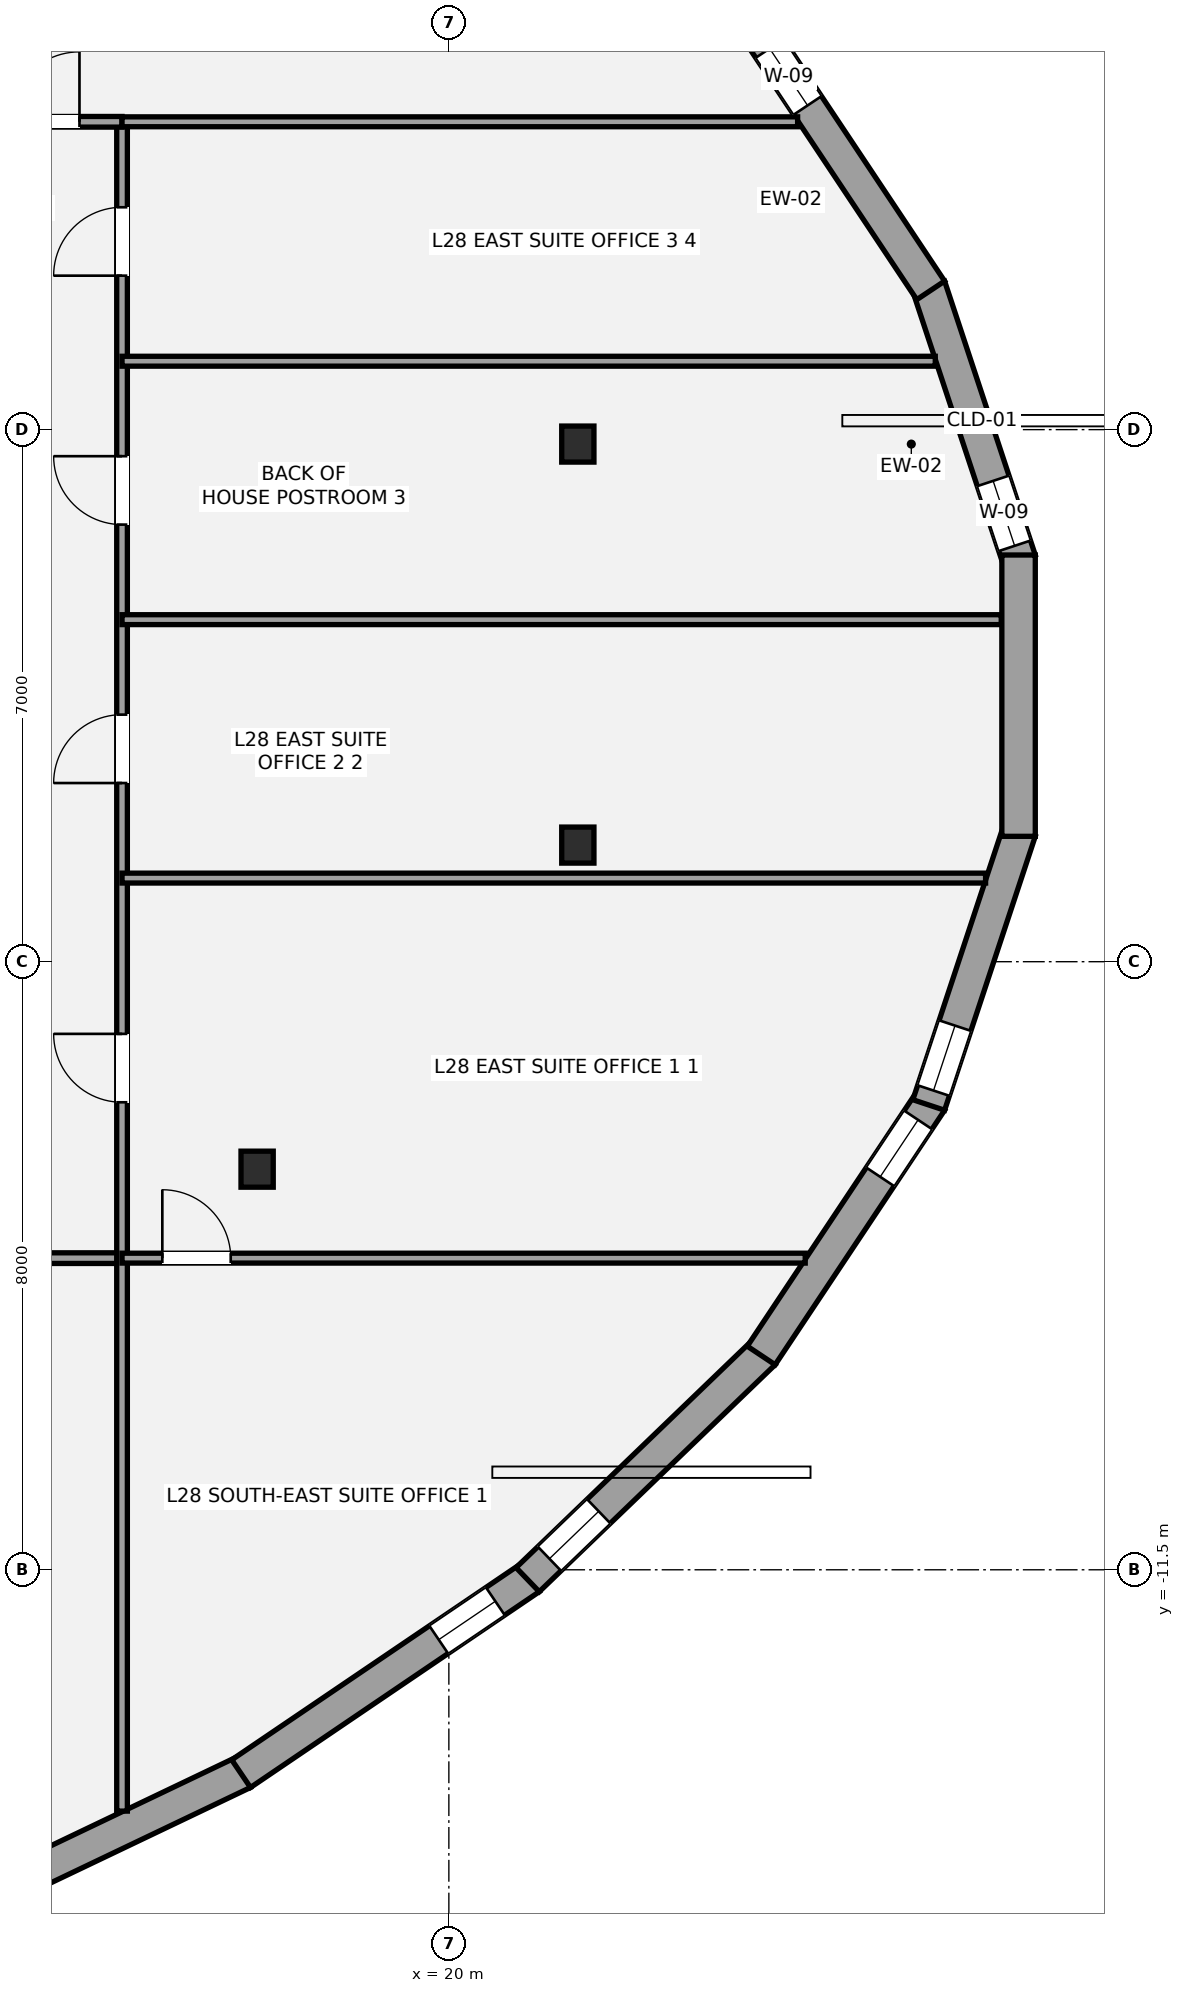
"""IFC4 building model, lengths in metres.
Left out: names, types, materials, properties, quantities, classifications, styles, units other than length and angle.
Written with IfcOpenShell. Run it as: python <this file> out.ifc"""

import sys

from ifc_helpers import new_model, si_unit, direction, frame, frame_2d, origin, origin_2d, place, context, subcontext, project, spatial, rectangle, i_section, extrude, element, fill, save


model = new_model("IFC4")
c1 = context("Model", 3, precision=1e-05, world=origin(), true_north=direction((0.0, 1.0)))
c2 = subcontext(c1, "Body", "Model", "MODEL_VIEW")
j1 = project(units=[si_unit("LENGTHUNIT", "METRE"), si_unit("PLANEANGLEUNIT", "RADIAN")], contexts=[c1])
p1 = place(None, origin())
s1 = spatial("IfcSite", under=j1, at=p1, CompositionType="ELEMENT")
p2 = place(p1, origin())
s2 = spatial("IfcBuilding", under=s1, at=p2, CompositionType="ELEMENT")
p3 = place(p2, frame((0.0, 0.0, 107.1)))
s3 = spatial("IfcBuildingStorey", under=s2, at=p3, CompositionType="ELEMENT", Elevation=107.1)
for number, where, z_axis, x_axis in (
    (1, (21.697, 3.31, 0.0), (0.0, 0.0, 1.0), (1.0, 0.0, 0.0)),
    (2, (17.477, -6.229, 0.0), (0.0, 0.0, 1.0), (1.0, 0.0, 0.0)),
    (3, (21.697, -1.966, 0.0), (0.0, 0.0, 1.0), (1.0, 0.0, 0.0)),
):
    element("IfcColumn", number, at=place(p3, frame(where, z_axis=z_axis, x_axis=x_axis)), inside=s3, PredefinedType="COLUMN", context=c2, shape_type="SweptSolid", body=[
        extrude(i_section(OverallWidth=0.424, OverallDepth=0.474, WebThickness=0.048, FlangeThickness=0.077, at=origin_2d()), origin(), (0.0, 0.0, 1.0), 3.5),
    ])
p4 = place(p3, frame((26.314, 5.385, 0.0), z_axis=(0.0, 0.0, 1.0), x_axis=(0.314316911692, -0.94931811266, 0.0)))
e4 = element("IfcWall", 4, at=p4, inside=s3, PredefinedType="STANDARD", context=c2, shape_type="SweptSolid", body=[
    extrude(rectangle(XDim=3.796, YDim=0.44, at=frame_2d((1.898, 0.0))), origin(), (0.0, 0.0, 1.0), 2.528),
])
p5 = place(p4, frame((2.696, 0.0, 0.58)))
e5 = element("IfcOpeningElement", 5, at=p5, cuts=e4, PredefinedType="OPENING", context=c2, shape_type="SweptSolid", body=[
    extrude(rectangle(XDim=0.9, YDim=1.35, at=frame_2d((0.45, 0.675))), frame((0.0, 0.23, 0.0), z_axis=(0.0, -1.0, 0.0), x_axis=(1.0, 0.0, 0.0)), (0.0, 0.0, 1.0), 0.46),
])
p6 = place(p3, frame((24.11, 8.68, 0.0), z_axis=(0.0, 0.0, 1.0), x_axis=(0.554293965046, -0.83232097193, 0.0)))
e6 = element("IfcWall", 6, at=p6, inside=s3, PredefinedType="STANDARD", context=c2, shape_type="SweptSolid", body=[
    extrude(rectangle(XDim=4.023, YDim=0.44, at=frame_2d((2.011, 0.0))), origin(), (0.0, 0.0, 1.0), 2.528),
])
p7 = place(p6, frame((0.2, 0.0, 0.58)))
e7 = element("IfcOpeningElement", 7, at=p7, cuts=e6, PredefinedType="OPENING", context=c2, shape_type="SweptSolid", body=[
    extrude(rectangle(XDim=0.9, YDim=1.35, at=frame_2d((0.45, 0.675))), frame((0.0, 0.23, 0.0), z_axis=(0.0, -1.0, 0.0), x_axis=(1.0, 0.0, 0.0)), (0.0, 0.0, 1.0), 0.46),
])
p8 = place(p3, frame((17.295, -14.166, 0.0), z_axis=(0.0, 0.0, 1.0), x_axis=(-0.902372757907, -0.430956385018, 0.0)))
e8 = element("IfcWall", 8, at=p8, inside=s3, PredefinedType="STANDARD", context=c2, shape_type="SweptSolid", body=[
    extrude(rectangle(XDim=4.882, YDim=0.44, at=frame_2d((2.441, 0.0))), origin(), (0.0, 0.0, 1.0), 2.528),
])
p9 = place(p8, frame((3.334, 0.0, 0.58)))
e9 = element("IfcOpeningElement", 9, at=p9, cuts=e8, PredefinedType="OPENING", context=c2, shape_type="SweptSolid", body=[
    extrude(rectangle(XDim=0.9, YDim=1.35, at=frame_2d((0.45, 0.675))), frame((0.0, 0.23, 0.0), z_axis=(0.0, -1.0, 0.0), x_axis=(1.0, 0.0, 0.0)), (0.0, 0.0, 1.0), 0.46),
])
p10 = place(p3, frame((21.066, -11.606, 0.0), z_axis=(0.0, 0.0, 1.0), x_axis=(-0.827754551165, -0.56109036975, 0.0)))
e10 = element("IfcWall", 10, at=p10, inside=s3, PredefinedType="STANDARD", context=c2, shape_type="SweptSolid", body=[
    extrude(rectangle(XDim=4.591, YDim=0.44, at=frame_2d((2.295, 0.0))), origin(), (0.0, 0.0, 1.0), 2.528),
])
p11 = place(p10, frame((0.549, 0.0, 0.58)))
e11 = element("IfcOpeningElement", 11, at=p11, cuts=e10, PredefinedType="OPENING", context=c2, shape_type="SweptSolid", body=[
    extrude(rectangle(XDim=0.9, YDim=1.35, at=frame_2d((0.45, 0.675))), frame((0.0, 0.23, 0.0), z_axis=(0.0, -1.0, 0.0), x_axis=(1.0, 0.0, 0.0)), (0.0, 0.0, 1.0), 0.46),
])
p12 = place(p3, frame((24.14, -8.644, 0.0), z_axis=(0.0, 0.0, 1.0), x_axis=(-0.720581378362, -0.693370375166, 0.0)))
e12 = element("IfcWall", 12, at=p12, inside=s3, PredefinedType="STANDARD", context=c2, shape_type="SweptSolid", body=[
    extrude(rectangle(XDim=4.307, YDim=0.44, at=frame_2d((2.153, 0.0))), origin(), (0.0, 0.0, 1.0), 2.528),
])
p13 = place(p12, frame((3.01, 0.0, 0.58)))
e13 = element("IfcOpeningElement", 13, at=p13, cuts=e12, PredefinedType="OPENING", context=c2, shape_type="SweptSolid", body=[
    extrude(rectangle(XDim=0.9, YDim=1.35, at=frame_2d((0.45, 0.675))), frame((0.0, 0.23, 0.0), z_axis=(0.0, -1.0, 0.0), x_axis=(1.0, 0.0, 0.0)), (0.0, 0.0, 1.0), 0.46),
])
p14 = place(p3, frame((26.34, -5.332, 0.0), z_axis=(0.0, 0.0, 1.0), x_axis=(-0.554293965046, -0.83232097193, 0.0)))
e14 = element("IfcWall", 14, at=p14, inside=s3, PredefinedType="STANDARD", context=c2, shape_type="SweptSolid", body=[
    extrude(rectangle(XDim=4.023, YDim=0.44, at=frame_2d((2.011, 0.0))), origin(), (0.0, 0.0, 1.0), 2.528),
])
p15 = place(p14, frame((0.299, 0.0, 0.58)))
e15 = element("IfcOpeningElement", 15, at=p15, cuts=e14, PredefinedType="OPENING", context=c2, shape_type="SweptSolid", body=[
    extrude(rectangle(XDim=0.9, YDim=1.35, at=frame_2d((0.45, 0.675))), frame((0.0, 0.23, 0.0), z_axis=(0.0, -1.0, 0.0), x_axis=(1.0, 0.0, 0.0)), (0.0, 0.0, 1.0), 0.46),
])
p16 = place(p3, frame((27.507, -1.781, 0.0), z_axis=(0.0, 0.0, 1.0), x_axis=(-0.314316911692, -0.94931811266, 0.0)))
e16 = element("IfcWall", 16, at=p16, inside=s3, PredefinedType="STANDARD", context=c2, shape_type="SweptSolid", body=[
    extrude(rectangle(XDim=3.796, YDim=0.44, at=frame_2d((1.898, 0.0))), origin(), (0.0, 0.0, 1.0), 2.528),
])
p17 = place(p16, frame((2.696, 0.0, 0.58)))
e17 = element("IfcOpeningElement", 17, at=p17, cuts=e16, PredefinedType="OPENING", context=c2, shape_type="SweptSolid", body=[
    extrude(rectangle(XDim=0.9, YDim=1.35, at=frame_2d((0.45, 0.675))), frame((0.0, 0.23, 0.0), z_axis=(0.0, -1.0, 0.0), x_axis=(1.0, 0.0, 0.0)), (0.0, 0.0, 1.0), 0.46),
])
p18 = place(p3, frame((27.496, 1.851, 0.0), z_axis=(0.0, 0.0, 1.0), x_axis=(0.0, -1.0, 0.0)))
e18 = element("IfcWall", 18, at=p18, inside=s3, PredefinedType="STANDARD", context=c2, shape_type="SweptSolid", body=[
    extrude(rectangle(XDim=3.701, YDim=0.44, at=frame_2d((1.851, 0.0))), origin(), (0.0, 0.0, 1.0), 2.528),
])
p19 = place(p3, frame((-17.5, -7.4, 0.0), z_axis=(0.0, 0.0, 1.0), x_axis=(1.0, 0.0, 0.0)))
e19 = element("IfcWall", 19, at=p19, inside=s3, PredefinedType="PARTITIONING", context=c2, shape_type="SweptSolid", body=[
    extrude(rectangle(XDim=33.2, YDim=0.14, at=frame_2d((16.6, 0.0))), origin(), (0.0, 0.0, 1.0), 2.688),
])
p20 = place(p19, frame((6.3, 0.0, 0.0)))
e20 = element("IfcOpeningElement", 20, at=p20, cuts=e19, PredefinedType="OPENING", context=c2, shape_type="SweptSolid", body=[
    extrude(rectangle(XDim=0.9, YDim=2.1, at=frame_2d((0.45, 1.05))), frame((0.0, 0.08, 0.0), z_axis=(0.0, -1.0, 0.0), x_axis=(1.0, 0.0, 0.0)), (0.0, 0.0, 1.0), 0.16),
])
p21 = place(p19, frame((18.05, 0.0, 0.0)))
e21 = element("IfcOpeningElement", 21, at=p21, cuts=e19, PredefinedType="OPENING", context=c2, shape_type="SweptSolid", body=[
    extrude(rectangle(XDim=0.9, YDim=2.1, at=frame_2d((0.45, 1.05))), frame((0.0, 0.08, 0.0), z_axis=(0.0, -1.0, 0.0), x_axis=(1.0, 0.0, 0.0)), (0.0, 0.0, 1.0), 0.16),
])
p22 = place(p19, frame((27.9, 0.0, 0.0)))
e22 = element("IfcOpeningElement", 22, at=p22, cuts=e19, PredefinedType="OPENING", context=c2, shape_type="SweptSolid", body=[
    extrude(rectangle(XDim=0.9, YDim=2.1, at=frame_2d((0.45, 1.05))), frame((0.0, 0.08, 0.0), z_axis=(0.0, -1.0, 0.0), x_axis=(1.0, 0.0, 0.0)), (0.0, 0.0, 1.0), 0.16),
])
p23 = place(p3, frame((15.7, -14.675, 0.0), z_axis=(0.0, 0.0, 1.0), x_axis=(0.0, 1.0, 0.0)))
e23 = element("IfcWall", 23, at=p23, inside=s3, PredefinedType="PARTITIONING", context=c2, shape_type="SweptSolid", body=[
    extrude(rectangle(XDim=22.225, YDim=0.14, at=frame_2d((11.112, 0.0))), origin(), (0.0, 0.0, 1.0), 2.763),
])
p24 = place(p23, frame((9.325, 0.0, 0.0)))
e24 = element("IfcOpeningElement", 24, at=p24, cuts=e23, PredefinedType="OPENING", context=c2, shape_type="SweptSolid", body=[
    extrude(rectangle(XDim=0.9, YDim=2.1, at=frame_2d((0.45, 1.05))), frame((0.0, 0.08, 0.0), z_axis=(0.0, -1.0, 0.0), x_axis=(1.0, 0.0, 0.0)), (0.0, 0.0, 1.0), 0.16),
])
p25 = place(p23, frame((13.525, 0.0, 0.0)))
e25 = element("IfcOpeningElement", 25, at=p25, cuts=e23, PredefinedType="OPENING", context=c2, shape_type="SweptSolid", body=[
    extrude(rectangle(XDim=0.9, YDim=2.1, at=frame_2d((0.45, 1.05))), frame((0.0, 0.08, 0.0), z_axis=(0.0, -1.0, 0.0), x_axis=(1.0, 0.0, 0.0)), (0.0, 0.0, 1.0), 0.16),
])
p26 = place(p23, frame((16.925, 0.0, 0.0)))
e26 = element("IfcOpeningElement", 26, at=p26, cuts=e23, PredefinedType="OPENING", context=c2, shape_type="SweptSolid", body=[
    extrude(rectangle(XDim=0.9, YDim=2.1, at=frame_2d((0.45, 1.05))), frame((0.0, 0.08, 0.0), z_axis=(0.0, -1.0, 0.0), x_axis=(1.0, 0.0, 0.0)), (0.0, 0.0, 1.0), 0.16),
])
p27 = place(p23, frame((20.2, 0.0, 0.0)))
e27 = element("IfcOpeningElement", 27, at=p27, cuts=e23, PredefinedType="OPENING", context=c2, shape_type="SweptSolid", body=[
    extrude(rectangle(XDim=0.9, YDim=2.1, at=frame_2d((0.45, 1.05))), frame((0.0, 0.08, 0.0), z_axis=(0.0, -1.0, 0.0), x_axis=(1.0, 0.0, 0.0)), (0.0, 0.0, 1.0), 0.16),
])
p28 = place(p3, frame((13.9, 7.55, 0.0), z_axis=(0.0, 0.0, 1.0), x_axis=(1.0, 0.0, 0.0)))
e28 = element("IfcWall", 28, at=p28, inside=s3, PredefinedType="PARTITIONING", context=c2, shape_type="SweptSolid", body=[
    extrude(rectangle(XDim=1.8, YDim=0.14, at=frame_2d((0.9, 0.0))), origin(), (0.0, 0.0, 1.0), 2.763),
])
p29 = place(p28, frame((0.32, 0.0, 0.0)))
e29 = element("IfcOpeningElement", 29, at=p29, cuts=e28, PredefinedType="OPENING", context=c2, shape_type="SweptSolid", body=[
    extrude(rectangle(XDim=0.92, YDim=2.15, at=frame_2d((0.46, 1.075))), frame((0.0, 0.08, 0.0), z_axis=(0.0, -1.0, 0.0), x_axis=(1.0, 0.0, 0.0)), (0.0, 0.0, 1.0), 0.16),
])
p30 = place(p3, frame((15.7, 7.55, 0.0), z_axis=(0.0, 0.0, 1.0), x_axis=(1.0, 0.0, 0.0)))
e30 = element("IfcWall", 30, at=p30, inside=s3, PredefinedType="PARTITIONING", context=c2, shape_type="SweptSolid", body=[
    extrude(rectangle(XDim=8.889, YDim=0.13, at=frame_2d((4.444, 0.0))), origin(), (0.0, 0.0, 1.0), 2.763),
])
p31 = place(p3, frame((15.7, -7.4, 0.0), z_axis=(0.0, 0.0, 1.0), x_axis=(1.0, 0.0, 0.0)))
e31 = element("IfcWall", 31, at=p31, inside=s3, PredefinedType="PARTITIONING", context=c2, shape_type="SweptSolid", body=[
    extrude(rectangle(XDim=8.989, YDim=0.13, at=frame_2d((4.494, 0.0))), origin(), (0.0, 0.0, 1.0), 2.763),
])
p32 = place(p31, frame((0.53, 0.0, 0.0)))
e32 = element("IfcOpeningElement", 32, at=p32, cuts=e31, PredefinedType="OPENING", context=c2, shape_type="SweptSolid", body=[
    extrude(rectangle(XDim=0.9, YDim=2.1, at=frame_2d((0.45, 1.05))), frame((0.0, 0.075, 0.0), z_axis=(0.0, -1.0, 0.0), x_axis=(1.0, 0.0, 0.0)), (0.0, 0.0, 1.0), 0.15),
])
p33 = place(p3, frame((15.7, -2.4, 0.0), z_axis=(0.0, 0.0, 1.0), x_axis=(1.0, 0.0, 0.0)))
e33 = element("IfcWall", 33, at=p33, inside=s3, PredefinedType="PARTITIONING", context=c2, shape_type="SweptSolid", body=[
    extrude(rectangle(XDim=11.362, YDim=0.13, at=frame_2d((5.681, 0.0))), origin(), (0.0, 0.0, 1.0), 2.688),
])
p34 = place(p3, frame((15.7, 1.0, 0.0), z_axis=(0.0, 0.0, 1.0), x_axis=(1.0, 0.0, 0.0)))
e34 = element("IfcWall", 34, at=p34, inside=s3, PredefinedType="PARTITIONING", context=c2, shape_type="SweptSolid", body=[
    extrude(rectangle(XDim=11.568, YDim=0.13, at=frame_2d((5.784, 0.0))), origin(), (0.0, 0.0, 1.0), 2.763),
])
p35 = place(p3, frame((15.7, 4.4, 0.0), z_axis=(0.0, 0.0, 1.0), x_axis=(1.0, 0.0, 0.0)))
e35 = element("IfcWall", 35, at=p35, inside=s3, PredefinedType="PARTITIONING", context=c2, shape_type="SweptSolid", body=[
    extrude(rectangle(XDim=10.7, YDim=0.13, at=frame_2d((5.35, 0.0))), origin(), (0.0, 0.0, 1.0), 2.763),
])
p36 = place(p5, origin())
e36 = element("IfcWindow", 36, at=p36, inside=s3, PartitioningType="SINGLE_PANEL", PredefinedType="WINDOW", context=c2, shape_type="SweptSolid", body=[
    extrude(rectangle(XDim=0.9, YDim=1.35, at=frame_2d((0.45, 0.675))), frame((0.0, -0.01, 0.0), z_axis=(0.0, -1.0, 0.0), x_axis=(1.0, 0.0, 0.0)), (0.0, 0.0, 1.0), 0.06),
])
fill(e5, e36)
p37 = place(p7, origin())
e37 = element("IfcWindow", 37, at=p37, inside=s3, PartitioningType="SINGLE_PANEL", PredefinedType="WINDOW", context=c2, shape_type="SweptSolid", body=[
    extrude(rectangle(XDim=0.9, YDim=1.35, at=frame_2d((0.45, 0.675))), frame((0.0, -0.01, 0.0), z_axis=(0.0, -1.0, 0.0), x_axis=(1.0, 0.0, 0.0)), (0.0, 0.0, 1.0), 0.06),
])
fill(e7, e37)
p38 = place(p11, origin())
e38 = element("IfcWindow", 38, at=p38, inside=s3, PartitioningType="SINGLE_PANEL", PredefinedType="WINDOW", context=c2, shape_type="SweptSolid", body=[
    extrude(rectangle(XDim=0.9, YDim=1.35, at=frame_2d((0.45, 0.675))), frame((0.0, -0.01, 0.0), z_axis=(0.0, -1.0, 0.0), x_axis=(1.0, 0.0, 0.0)), (0.0, 0.0, 1.0), 0.06),
])
fill(e11, e38)
p39 = place(p13, origin())
e39 = element("IfcWindow", 39, at=p39, inside=s3, PartitioningType="SINGLE_PANEL", PredefinedType="WINDOW", context=c2, shape_type="SweptSolid", body=[
    extrude(rectangle(XDim=0.9, YDim=1.35, at=frame_2d((0.45, 0.675))), frame((0.0, -0.01, 0.0), z_axis=(0.0, -1.0, 0.0), x_axis=(1.0, 0.0, 0.0)), (0.0, 0.0, 1.0), 0.06),
])
fill(e13, e39)
p40 = place(p15, origin())
e40 = element("IfcWindow", 40, at=p40, inside=s3, PartitioningType="SINGLE_PANEL", PredefinedType="WINDOW", context=c2, shape_type="SweptSolid", body=[
    extrude(rectangle(XDim=0.9, YDim=1.35, at=frame_2d((0.45, 0.675))), frame((0.0, -0.01, 0.0), z_axis=(0.0, -1.0, 0.0), x_axis=(1.0, 0.0, 0.0)), (0.0, 0.0, 1.0), 0.06),
])
fill(e15, e40)
p41 = place(p17, origin())
e41 = element("IfcWindow", 41, at=p41, inside=s3, PartitioningType="SINGLE_PANEL", PredefinedType="WINDOW", context=c2, shape_type="SweptSolid", body=[
    extrude(rectangle(XDim=0.9, YDim=1.35, at=frame_2d((0.45, 0.675))), frame((0.0, -0.01, 0.0), z_axis=(0.0, -1.0, 0.0), x_axis=(1.0, 0.0, 0.0)), (0.0, 0.0, 1.0), 0.06),
])
fill(e17, e41)
p42 = place(p29, origin())
e42 = element("IfcDoor", 42, at=p42, inside=s3, OperationType="SINGLE_SWING_RIGHT", PredefinedType="DOOR", context=c2, shape_type="SweptSolid", body=[
    extrude(rectangle(XDim=0.92, YDim=2.15, at=frame_2d((0.46, 1.075))), frame((0.0, 0.025, 0.0), z_axis=(0.0, -1.0, 0.0), x_axis=(1.0, 0.0, 0.0)), (0.0, 0.0, 1.0), 0.05),
])
fill(e29, e42)
p43 = place(p32, origin())
e43 = element("IfcDoor", 43, at=p43, inside=s3, OperationType="SINGLE_SWING_LEFT", PredefinedType="DOOR", context=c2, shape_type="SweptSolid", body=[
    extrude(rectangle(XDim=0.9, YDim=2.1, at=frame_2d((0.45, 1.05))), frame((0.0, 0.025, 0.0), z_axis=(0.0, -1.0, 0.0), x_axis=(1.0, 0.0, 0.0)), (0.0, 0.0, 1.0), 0.05),
])
fill(e32, e43)
p44 = place(p24, origin())
e44 = element("IfcDoor", 44, at=p44, inside=s3, OperationType="SINGLE_SWING_RIGHT", PredefinedType="DOOR", context=c2, shape_type="SweptSolid", body=[
    extrude(rectangle(XDim=0.9, YDim=2.1, at=frame_2d((0.45, 1.05))), frame((0.0, 0.025, 0.0), z_axis=(0.0, -1.0, 0.0), x_axis=(1.0, 0.0, 0.0)), (0.0, 0.0, 1.0), 0.05),
])
fill(e24, e44)
p45 = place(p25, origin())
e45 = element("IfcDoor", 45, at=p45, inside=s3, OperationType="SINGLE_SWING_LEFT", PredefinedType="DOOR", context=c2, shape_type="SweptSolid", body=[
    extrude(rectangle(XDim=0.9, YDim=2.1, at=frame_2d((0.45, 1.05))), frame((0.0, 0.025, 0.0), z_axis=(0.0, -1.0, 0.0), x_axis=(1.0, 0.0, 0.0)), (0.0, 0.0, 1.0), 0.05),
])
fill(e25, e45)
p46 = place(p26, origin())
e46 = element("IfcDoor", 46, at=p46, inside=s3, OperationType="SINGLE_SWING_RIGHT", PredefinedType="DOOR", context=c2, shape_type="SweptSolid", body=[
    extrude(rectangle(XDim=0.9, YDim=2.1, at=frame_2d((0.45, 1.05))), frame((0.0, 0.025, 0.0), z_axis=(0.0, -1.0, 0.0), x_axis=(1.0, 0.0, 0.0)), (0.0, 0.0, 1.0), 0.05),
])
fill(e26, e46)
p47 = place(p27, origin())
e47 = element("IfcDoor", 47, at=p47, inside=s3, OperationType="SINGLE_SWING_LEFT", PredefinedType="DOOR", context=c2, shape_type="SweptSolid", body=[
    extrude(rectangle(XDim=0.9, YDim=2.1, at=frame_2d((0.45, 1.05))), frame((0.0, 0.025, 0.0), z_axis=(0.0, -1.0, 0.0), x_axis=(1.0, 0.0, 0.0)), (0.0, 0.0, 1.0), 0.05),
])
fill(e27, e47)
save(model, sys.argv[1])
